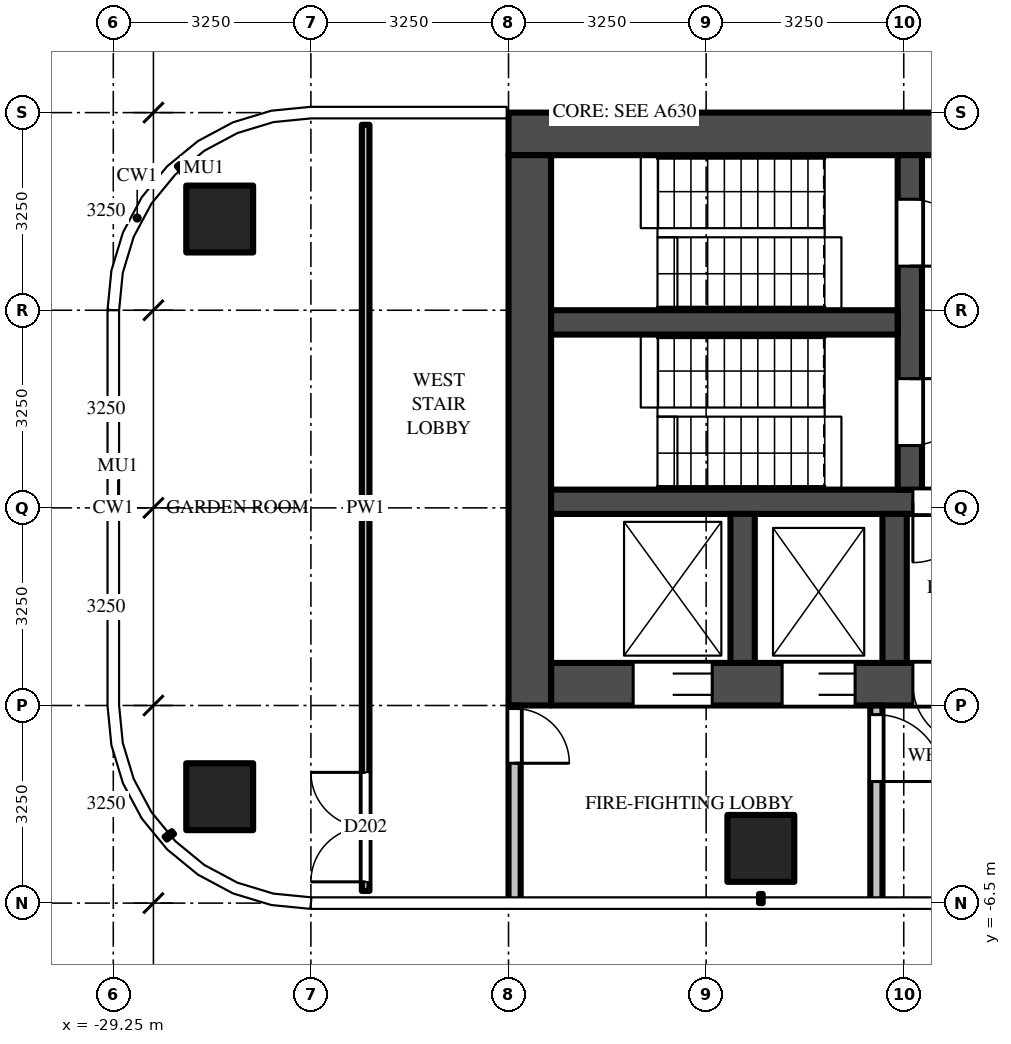
"""IFC4 building model, lengths in metres.
Left out: names, types, materials, properties, quantities, classifications, styles, units other than length and angle.
Written with IfcOpenShell. Run it as: python <this file> out.ifc"""

import sys

from ifc_helpers import new_model, si_unit, direction, frame, frame_2d, origin, origin_2d, place, context, subcontext, project, spatial, polyline, rectangle, outline, extrude, source, transform, mapped, element, fill, save


model = new_model("IFC4")
c1 = context("Model", 3, precision=1e-05, world=origin(), true_north=direction((0.0, 1.0)))
c2 = subcontext(c1, "Body", "Model", "MODEL_VIEW")
j1 = project(units=[si_unit("LENGTHUNIT", "METRE"), si_unit("PLANEANGLEUNIT", "RADIAN")], contexts=[c1])
p1 = place(None, origin())
s1 = spatial("IfcSite", under=j1, at=p1, CompositionType="ELEMENT")
p2 = place(p1, origin())
s2 = spatial("IfcBuilding", under=s1, at=p2, CompositionType="ELEMENT")
p3 = place(p2, frame((0.0, 0.0, 240.2)))
s3 = spatial("IfcBuildingStorey", under=s2, at=p3, CompositionType="ELEMENT", Elevation=240.2)
m1 = source(origin(), c2, "Body", "SweptSolid", [
    extrude(rectangle(XDim=1.1, YDim=1.1, at=origin_2d()), origin(), (0.0, 0.0, 1.0), 3.9),
])
for number, where, z_axis, x_axis in (
    (1, (-18.6, -5.6, 0.0), (0.0, 0.0, 1.0), (1.0, 0.0, 0.0)),
    (2, (-27.5, -4.75, 0.0), (0.0, 0.0, 1.0), (1.0, 0.0, 0.0)),
    (3, (-27.5, 4.75, 0.0), (0.0, 0.0, 1.0), (1.0, 0.0, 0.0)),
):
    element("IfcColumn", number, at=place(p3, frame(where, z_axis=z_axis, x_axis=x_axis)), inside=s3, PredefinedType="COLUMN", context=c2, shape_type="MappedRepresentation", body=[
        mapped(m1, transform((0.0, 0.0, 0.0))),
    ])
m2 = source(origin(), c2, "Body", "SweptSolid", [
    extrude(rectangle(XDim=16.6, YDim=0.7, at=frame_2d((8.3, 0.0))), origin(), (0.0, 0.0, 1.0), 3.7),
])
p4 = place(p3, frame((-6.15, 6.15, 0.0), z_axis=(0.0, 0.0, 1.0), x_axis=(-1.0, 0.0, 0.0)))
e4 = element("IfcWall", 4, at=p4, inside=s3, PredefinedType="SHEAR", context=c2, shape_type="MappedRepresentation", body=[
    mapped(m2, transform((0.0, 0.0, 0.0))),
])
m3 = source(origin(), c2, "Body", "SweptSolid", [
    extrude(rectangle(XDim=14.85, YDim=0.7, at=frame_2d((7.425, 0.0))), origin(), (0.0, 0.0, 1.0), 3.7),
])
p5 = place(p3, frame((-7.2, -2.9, 0.0), z_axis=(0.0, 0.0, 1.0), x_axis=(-1.0, 0.0, 0.0)))
e5 = element("IfcWall", 5, at=p5, inside=s3, PredefinedType="SHEAR", context=c2, shape_type="MappedRepresentation", body=[
    mapped(m3, transform((0.0, 0.0, 0.0))),
])
m4 = source(origin(), c2, "Body", "SweptSolid", [
    extrude(rectangle(XDim=1.1, YDim=2.1, at=frame_2d((0.55, 1.05))), frame((0.0, 0.36, 0.0), z_axis=(0.0, -1.0, 0.0), x_axis=(1.0, 0.0, 0.0)), (0.0, 0.0, 1.0), 0.72),
])
p6 = place(p5, frame((0.55, 0.0, 0.0)))
e6 = element("IfcOpeningElement", 6, at=p6, cuts=e5, PredefinedType="OPENING", context=c2, shape_type="MappedRepresentation", body=[
    mapped(m4, transform((0.0, 0.0, 0.0))),
])
p7 = place(p5, frame((3.15, 0.0, 0.0)))
e7 = element("IfcOpeningElement", 7, at=p7, cuts=e5, PredefinedType="OPENING", context=c2, shape_type="MappedRepresentation", body=[
    mapped(m4, transform((0.0, 0.0, 0.0))),
])
m5 = source(origin(), c2, "Body", "SweptSolid", [
    extrude(rectangle(XDim=1.2, YDim=2.1, at=frame_2d((0.6, 1.05))), frame((0.0, 0.36, 0.0), z_axis=(0.0, -1.0, 0.0), x_axis=(1.0, 0.0, 0.0)), (0.0, 0.0, 1.0), 0.72),
])
p8 = place(p5, frame((5.7, 0.0, 0.0)))
e8 = element("IfcOpeningElement", 8, at=p8, cuts=e5, PredefinedType="OPENING", context=c2, shape_type="MappedRepresentation", body=[
    mapped(m5, transform((0.0, 0.0, 0.0))),
])
m6 = source(origin(), c2, "Body", "SweptSolid", [
    extrude(rectangle(XDim=1.3, YDim=2.1, at=frame_2d((0.65, 1.05))), frame((0.0, 0.36, 0.0), z_axis=(0.0, -1.0, 0.0), x_axis=(1.0, 0.0, 0.0)), (0.0, 0.0, 1.0), 0.72),
])
p9 = place(p5, frame((12.2, 0.0, 0.0)))
e9 = element("IfcOpeningElement", 9, at=p9, cuts=e5, PredefinedType="OPENING", context=c2, shape_type="MappedRepresentation", body=[
    mapped(m6, transform((0.0, 0.0, 0.0))),
])
p10 = place(p5, frame((9.85, 0.0, 0.0)))
e10 = element("IfcOpeningElement", 10, at=p10, cuts=e5, PredefinedType="OPENING", context=c2, shape_type="MappedRepresentation", body=[
    mapped(m5, transform((0.0, 0.0, 0.0))),
])
m7 = source(origin(), c2, "Body", "SweptSolid", [
    extrude(rectangle(XDim=1.0, YDim=2.1, at=frame_2d((0.5, 1.05))), frame((0.0, 0.36, 0.0), z_axis=(0.0, -1.0, 0.0), x_axis=(1.0, 0.0, 0.0)), (0.0, 0.0, 1.0), 0.72),
])
p11 = place(p5, frame((7.9, 0.0, 0.0)))
e11 = element("IfcOpeningElement", 11, at=p11, cuts=e5, PredefinedType="OPENING", context=c2, shape_type="MappedRepresentation", body=[
    mapped(m7, transform((0.0, 0.0, 0.0))),
])
m8 = source(origin(), c2, "Body", "SweptSolid", [
    extrude(rectangle(XDim=9.05, YDim=0.7, at=frame_2d((4.525, 0.0))), origin(), (0.0, 0.0, 1.0), 3.7),
])
p12 = place(p3, frame((-22.4, 5.8, 0.0), z_axis=(0.0, 0.0, 1.0), x_axis=(0.0, -1.0, 0.0)))
e12 = element("IfcWall", 12, at=p12, inside=s3, PredefinedType="SHEAR", context=c2, shape_type="MappedRepresentation", body=[
    mapped(m8, transform((0.0, 0.0, 0.0))),
])
m9 = source(origin(), c2, "Body", "SweptSolid", [
    extrude(rectangle(XDim=14.85, YDim=0.4, at=frame_2d((7.425, 0.0))), origin(), (0.0, 0.0, 1.0), 3.7),
])
p13 = place(p3, frame((-7.2, 0.1, 0.0), z_axis=(0.0, 0.0, 1.0), x_axis=(-1.0, 0.0, 0.0)))
e13 = element("IfcWall", 13, at=p13, inside=s3, PredefinedType="SHEAR", context=c2, shape_type="MappedRepresentation", body=[
    mapped(m9, transform((0.0, 0.0, 0.0))),
])
m10 = source(origin(), c2, "Body", "SweptSolid", [
    extrude(rectangle(XDim=1.0, YDim=2.1, at=frame_2d((0.5, 1.05))), frame((0.0, 0.21, 0.0), z_axis=(0.0, -1.0, 0.0), x_axis=(1.0, 0.0, 0.0)), (0.0, 0.0, 1.0), 0.42),
])
p14 = place(p13, frame((7.9, 0.0, 0.0)))
e14 = element("IfcOpeningElement", 14, at=p14, cuts=e13, PredefinedType="OPENING", context=c2, shape_type="MappedRepresentation", body=[
    mapped(m10, transform((0.0, 0.0, 0.0))),
])
m11 = source(origin(), c2, "Body", "SweptSolid", [
    extrude(rectangle(XDim=5.5, YDim=0.4, at=frame_2d((2.75, 0.0))), origin(), (0.0, 0.0, 1.0), 3.7),
])
p15 = place(p3, frame((-16.15, 5.8, 0.0), z_axis=(0.0, 0.0, 1.0), x_axis=(0.0, -1.0, 0.0)))
e15 = element("IfcWall", 15, at=p15, inside=s3, PredefinedType="SHEAR", context=c2, shape_type="MappedRepresentation", body=[
    mapped(m11, transform((0.0, 0.0, 0.0))),
])
m12 = source(origin(), c2, "Body", "SweptSolid", [
    extrude(rectangle(XDim=1.1, YDim=2.1, at=frame_2d((0.55, 1.05))), frame((0.0, 0.21, 0.0), z_axis=(0.0, -1.0, 0.0), x_axis=(1.0, 0.0, 0.0)), (0.0, 0.0, 1.0), 0.42),
])
p16 = place(p15, frame((0.725, 0.0, 0.0)))
e16 = element("IfcOpeningElement", 16, at=p16, cuts=e15, PredefinedType="OPENING", context=c2, shape_type="MappedRepresentation", body=[
    mapped(m12, transform((0.0, 0.0, 0.0))),
])
p17 = place(p15, frame((3.675, 0.0, 0.0)))
e17 = element("IfcOpeningElement", 17, at=p17, cuts=e15, PredefinedType="OPENING", context=c2, shape_type="MappedRepresentation", body=[
    mapped(m12, transform((0.0, 0.0, 0.0))),
])
m13 = source(origin(), c2, "Body", "SweptSolid", [
    extrude(rectangle(XDim=5.7, YDim=0.4, at=frame_2d((2.85, 0.0))), origin(), (0.0, 0.0, 1.0), 3.7),
])
p18 = place(p3, frame((-16.35, 3.05, 0.0), z_axis=(0.0, 0.0, 1.0), x_axis=(-1.0, 0.0, 0.0)))
e18 = element("IfcWall", 18, at=p18, inside=s3, PredefinedType="SHEAR", context=c2, shape_type="MappedRepresentation", body=[
    mapped(m13, transform((0.0, 0.0, 0.0))),
])
m14 = source(origin(), c2, "Body", "SweptSolid", [
    extrude(rectangle(XDim=2.45, YDim=0.4, at=frame_2d((1.225, 0.0))), origin(), (0.0, 0.0, 1.0), 3.7),
])
for number, where, z_axis, x_axis in (
    (19, (-16.4, -0.1, 0.0), (0.0, 0.0, 1.0), (0.0, -1.0, 0.0)),
    (20, (-18.9, -0.1, 0.0), (0.0, 0.0, 1.0), (0.0, -1.0, 0.0)),
):
    element("IfcWall", number, at=place(p3, frame(where, z_axis=z_axis, x_axis=x_axis)), inside=s3, PredefinedType="SHEAR", context=c2, shape_type="MappedRepresentation", body=[
        mapped(m14, transform((0.0, 0.0, 0.0))),
    ])
m15 = source(origin(), c2, "Body", "SweptSolid", [
    extrude(rectangle(XDim=3.25, YDim=0.2, at=frame_2d((1.625, 0.0))), origin(), (0.0, 0.0, 1.0), 3.7),
])
p19 = place(p3, frame((-16.7, -3.25, 0.0), z_axis=(0.0, 0.0, 1.0), x_axis=(0.0, -1.0, 0.0)))
e21 = element("IfcWall", 21, at=p19, inside=s3, PredefinedType="PARTITIONING", context=c2, shape_type="MappedRepresentation", body=[
    mapped(m15, transform((0.0, 0.0, 0.0))),
])
m16 = source(origin(), c2, "Body", "SweptSolid", [
    extrude(rectangle(XDim=1.1, YDim=2.1, at=frame_2d((0.55, 1.05))), frame((0.0, 0.11, 0.0), z_axis=(0.0, -1.0, 0.0), x_axis=(1.0, 0.0, 0.0)), (0.0, 0.0, 1.0), 0.22),
])
p20 = place(p19, frame((0.15, 0.0, 0.0)))
e22 = element("IfcOpeningElement", 22, at=p20, cuts=e21, PredefinedType="OPENING", context=c2, shape_type="MappedRepresentation", body=[
    mapped(m16, transform((0.0, 0.0, 0.0))),
])
p21 = place(p3, frame((-22.65, -3.25, 0.0), z_axis=(0.0, 0.0, 1.0), x_axis=(0.0, -1.0, 0.0)))
e23 = element("IfcWall", 23, at=p21, inside=s3, PredefinedType="PARTITIONING", context=c2, shape_type="MappedRepresentation", body=[
    mapped(m15, transform((0.0, 0.0, 0.0))),
])
m17 = source(origin(), c2, "Body", "SweptSolid", [
    extrude(rectangle(XDim=0.9, YDim=2.1, at=frame_2d((0.45, 1.05))), frame((0.0, 0.11, 0.0), z_axis=(0.0, -1.0, 0.0), x_axis=(1.0, 0.0, 0.0)), (0.0, 0.0, 1.0), 0.22),
])
p22 = place(p21, frame((0.05, 0.0, 0.0)))
e24 = element("IfcOpeningElement", 24, at=p22, cuts=e23, PredefinedType="OPENING", context=c2, shape_type="MappedRepresentation", body=[
    mapped(m17, transform((0.0, 0.0, 0.0))),
])
p23 = place(p3, origin())
e25 = element("IfcWall", 25, at=p23, inside=s3, PredefinedType="USERDEFINED", context=c2, shape_type="SweptSolid", body=[
    extrude(outline(polyline([(-29.939, 7.119), (-28.633, 8.221), (-26.982, 8.705), (-26.45, 8.652), (-26.51, 8.055), (-26.926, 8.096), (-28.343, 7.681), (-29.455, 6.742), (-29.539, 6.569), (-30.079, 6.832), (-29.939, 7.119)])), origin(), (0.0, 0.0, 1.0), 0.5),
])
m18 = source(origin(), c2, "Body", "SweptSolid", [
    extrude(rectangle(XDim=12.6, YDim=0.125, at=frame_2d((6.3, 0.0))), origin(), (0.0, 0.0, 1.0), 2.78),
])
p24 = place(p3, frame((-25.1, -6.3, 0.0), z_axis=(0.0, 0.0, 1.0), x_axis=(0.0, 1.0, 0.0)))
e26 = element("IfcWall", 26, at=p24, inside=s3, PredefinedType="PARTITIONING", context=c2, shape_type="MappedRepresentation", body=[
    mapped(m18, transform((0.0, 0.0, 0.0))),
])
m19 = source(origin(), c2, "Body", "SweptSolid", [
    extrude(rectangle(XDim=1.8, YDim=2.1, at=frame_2d((0.9, 1.05))), frame((0.0, 0.073, 0.0), z_axis=(0.0, -1.0, 0.0), x_axis=(1.0, 0.0, 0.0)), (0.0, 0.0, 1.0), 0.145),
])
p25 = place(p24, frame((0.15, 0.0, 0.0)))
e27 = element("IfcOpeningElement", 27, at=p25, cuts=e26, PredefinedType="OPENING", context=c2, shape_type="MappedRepresentation", body=[
    mapped(m19, transform((0.0, 0.0, 0.0))),
])
m20 = source(origin(), c2, "Body", "SweptSolid", [
    extrude(rectangle(XDim=1.3, YDim=2.1, at=frame_2d((0.65, 1.05))), frame((0.0, -0.275, 0.0), z_axis=(0.0, -1.0, 0.0), x_axis=(1.0, 0.0, 0.0)), (0.0, 0.0, 1.0), 0.05),
])
p26 = place(p9, origin())
e28 = element("IfcDoor", 28, at=p26, inside=s3, OperationType="DOUBLE_DOOR_SLIDING", PredefinedType="DOOR", context=c2, shape_type="MappedRepresentation", body=[
    mapped(m20, transform((0.0, 0.0, 0.0))),
])
fill(e9, e28)
m21 = source(origin(), c2, "Body", "SweptSolid", [
    extrude(rectangle(XDim=1.2, YDim=2.1, at=frame_2d((0.6, 1.05))), frame((0.0, -0.275, 0.0), z_axis=(0.0, -1.0, 0.0), x_axis=(1.0, 0.0, 0.0)), (0.0, 0.0, 1.0), 0.05),
])
p27 = place(p10, origin())
e29 = element("IfcDoor", 29, at=p27, inside=s3, OperationType="DOUBLE_DOOR_SLIDING", PredefinedType="DOOR", context=c2, shape_type="MappedRepresentation", body=[
    mapped(m21, transform((0.0, 0.0, 0.0))),
])
fill(e10, e29)
m22 = source(origin(), c2, "Body", "SweptSolid", [
    extrude(rectangle(XDim=1.1, YDim=2.1, at=frame_2d((0.55, 1.05))), frame((0.0, 0.025, 0.0), z_axis=(0.0, -1.0, 0.0), x_axis=(1.0, 0.0, 0.0)), (0.0, 0.0, 1.0), 0.05),
])
p28 = place(p16, origin())
e30 = element("IfcDoor", 30, at=p28, inside=s3, OperationType="SINGLE_SWING_RIGHT", PredefinedType="DOOR", context=c2, shape_type="MappedRepresentation", body=[
    mapped(m22, transform((0.0, 0.0, 0.0))),
])
fill(e16, e30)
p29 = place(p17, origin())
e31 = element("IfcDoor", 31, at=p29, inside=s3, OperationType="SINGLE_SWING_LEFT", PredefinedType="DOOR", context=c2, shape_type="MappedRepresentation", body=[
    mapped(m22, transform((0.0, 0.0, 0.0))),
])
fill(e17, e31)
m23 = source(origin(), c2, "Body", "SweptSolid", [
    extrude(rectangle(XDim=1.0, YDim=2.1, at=frame_2d((0.5, 1.05))), frame((0.0, 0.025, 0.0), z_axis=(0.0, -1.0, 0.0), x_axis=(1.0, 0.0, 0.0)), (0.0, 0.0, 1.0), 0.05),
])
p30 = place(p14, origin())
e32 = element("IfcDoor", 32, at=p30, inside=s3, OperationType="SINGLE_SWING_RIGHT", PredefinedType="DOOR", context=c2, shape_type="MappedRepresentation", body=[
    mapped(m23, transform((0.0, 0.0, 0.0))),
])
fill(e14, e32)
m24 = source(origin(), c2, "Body", "SweptSolid", [
    extrude(rectangle(XDim=1.0, YDim=2.1, at=frame_2d((0.5, 1.05))), frame((0.0, -0.275, 0.0), z_axis=(0.0, -1.0, 0.0), x_axis=(1.0, 0.0, 0.0)), (0.0, 0.0, 1.0), 0.05),
])
p31 = place(p11, origin())
e33 = element("IfcDoor", 33, at=p31, inside=s3, OperationType="SINGLE_SWING_LEFT", PredefinedType="DOOR", context=c2, shape_type="MappedRepresentation", body=[
    mapped(m24, transform((0.0, 0.0, 0.0))),
])
fill(e11, e33)
p32 = place(p20, origin())
e34 = element("IfcDoor", 34, at=p32, inside=s3, OperationType="SINGLE_SWING_RIGHT", PredefinedType="DOOR", context=c2, shape_type="MappedRepresentation", body=[
    mapped(m22, transform((0.0, 0.0, 0.0))),
])
fill(e22, e34)
m25 = source(origin(), c2, "Body", "SweptSolid", [
    extrude(rectangle(XDim=0.9, YDim=2.1, at=frame_2d((0.45, 1.05))), frame((0.0, 0.025, 0.0), z_axis=(0.0, -1.0, 0.0), x_axis=(1.0, 0.0, 0.0)), (0.0, 0.0, 1.0), 0.05),
])
p33 = place(p22, origin())
e35 = element("IfcDoor", 35, at=p33, inside=s3, OperationType="SINGLE_SWING_RIGHT", PredefinedType="DOOR", context=c2, shape_type="MappedRepresentation", body=[
    mapped(m25, transform((0.0, 0.0, 0.0))),
])
fill(e24, e35)
m26 = source(origin(), c2, "Body", "SweptSolid", [
    extrude(rectangle(XDim=1.8, YDim=2.1, at=frame_2d((0.9, 1.05))), frame((0.0, 0.025, 0.0), z_axis=(0.0, -1.0, 0.0), x_axis=(1.0, 0.0, 0.0)), (0.0, 0.0, 1.0), 0.05),
])
p34 = place(p25, origin())
e36 = element("IfcDoor", 36, at=p34, inside=s3, OperationType="DOUBLE_DOOR_SINGLE_SWING", PredefinedType="DOOR", context=c2, shape_type="MappedRepresentation", body=[
    mapped(m26, transform((0.0, 0.0, 0.0))),
])
fill(e27, e36)
save(model, sys.argv[1])
